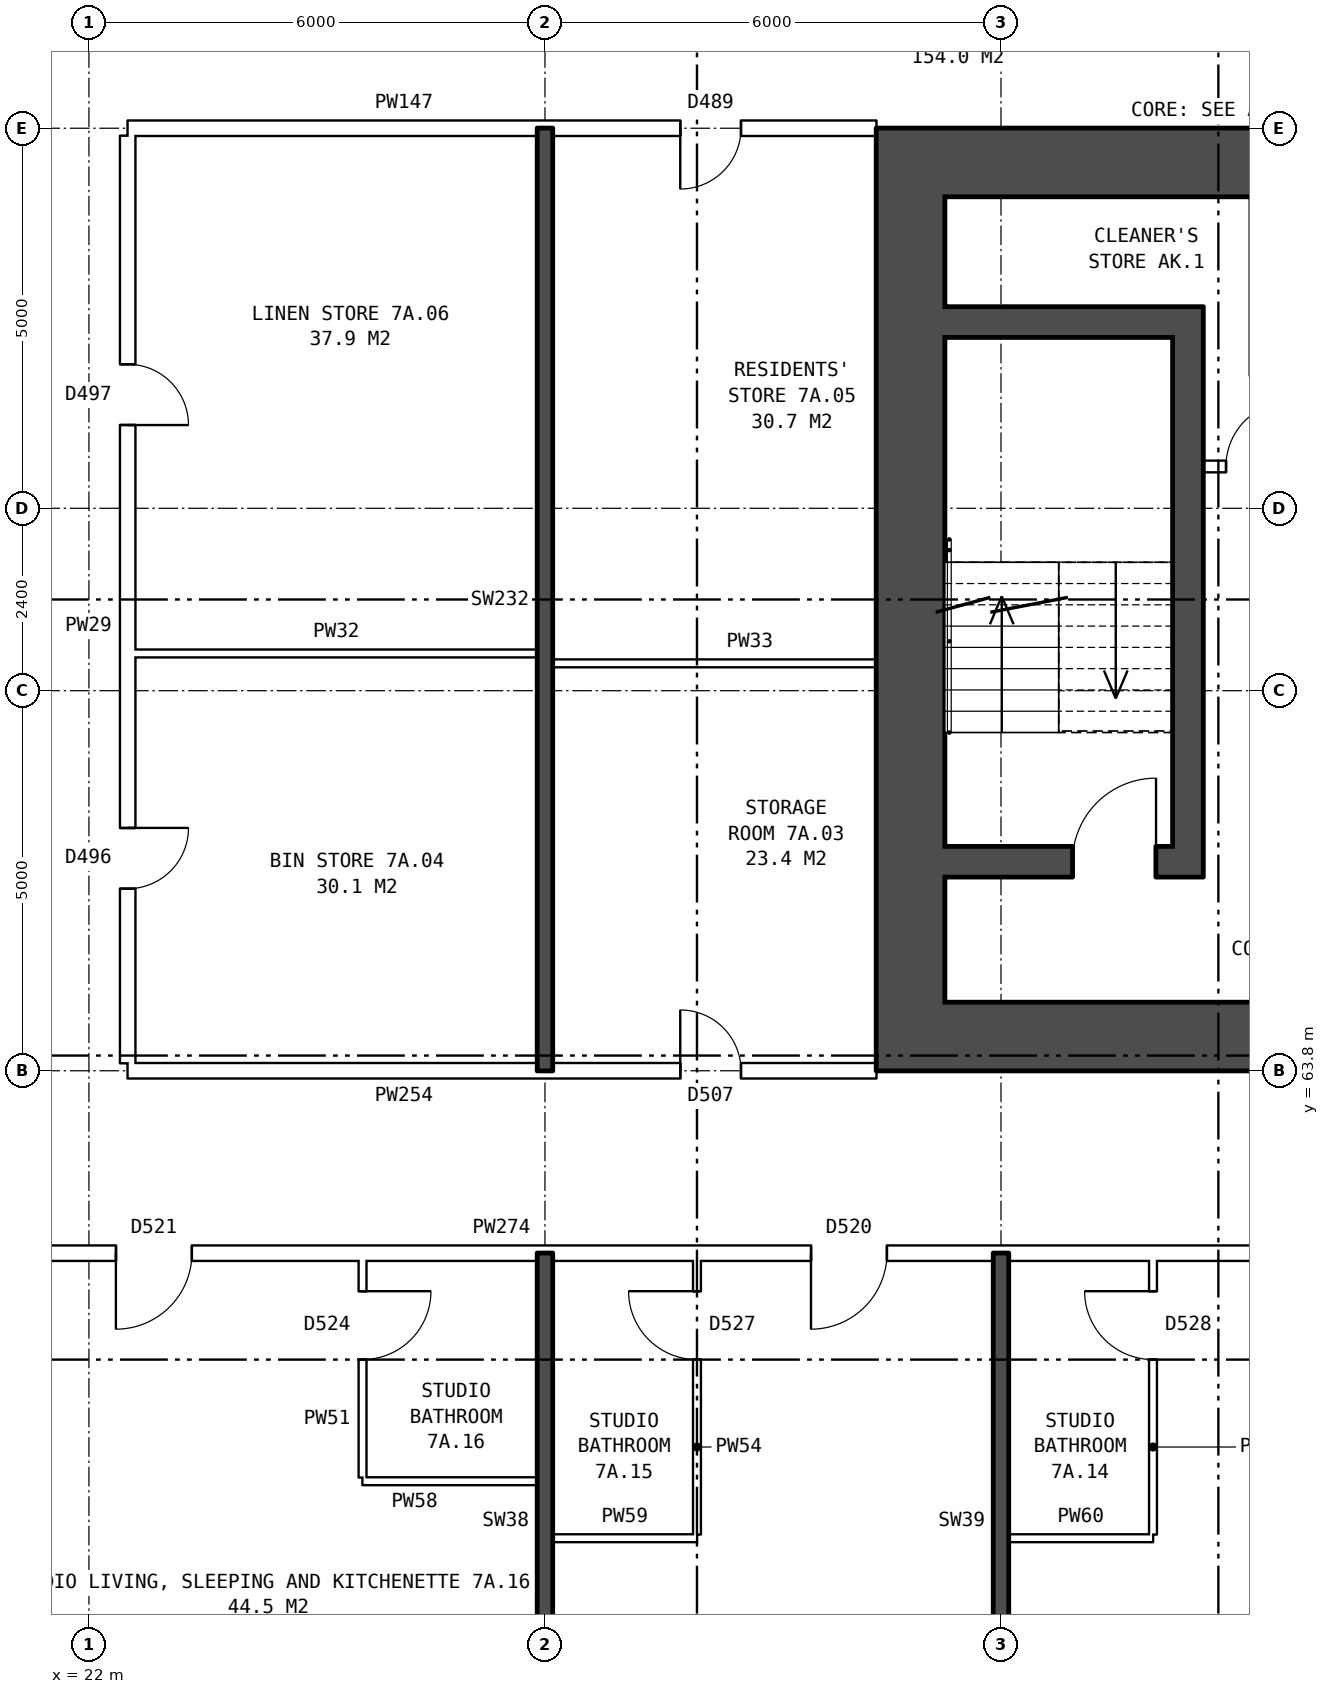
"""IFC4 building model, lengths in metres.
Left out: names, types, materials, properties, quantities, classifications, styles, units other than length and angle.
Written with IfcOpenShell. Run it as: python <this file> out.ifc"""

import sys

from ifc_helpers import new_model, si_unit, direction, frame, frame_2d, origin, place, context, subcontext, project, spatial, rectangle, extrude, element, fill, save


model = new_model("IFC4")
c1 = context("Model", 3, precision=1e-05, world=origin(), true_north=direction((0.0, 1.0)))
c2 = subcontext(c1, "Body", "Model", "MODEL_VIEW")
j1 = project(units=[si_unit("LENGTHUNIT", "METRE"), si_unit("PLANEANGLEUNIT", "RADIAN")], contexts=[c1])
p1 = place(None, origin())
s1 = spatial("IfcSite", under=j1, at=p1, CompositionType="ELEMENT")
p2 = place(p1, origin())
s2 = spatial("IfcBuilding", under=s1, at=p2, CompositionType="ELEMENT")
p3 = place(p2, frame((0.0, 0.0, 28.8)))
s3 = spatial("IfcBuildingStorey", under=s2, at=p3, CompositionType="ELEMENT", Elevation=28.8)
p4 = place(p3, frame((19.93, 57.075, 0.0), z_axis=(0.0, 0.0, 1.0), x_axis=(0.707106781187, -0.707106781187, 0.0)))
e1 = element("IfcWall", 1, at=p4, inside=s3, PredefinedType="STANDARD", context=c2, shape_type="SweptSolid", body=[
    extrude(rectangle(XDim=4.094, YDim=0.36, at=frame_2d((2.047, 0.0))), origin(), (0.0, 0.0, 1.0), 2.85),
])
p5 = place(p4, frame((1.247, 0.0, 0.8)))
e2 = element("IfcOpeningElement", 2, at=p5, cuts=e1, PredefinedType="OPENING", context=c2, shape_type="SweptSolid", body=[
    extrude(rectangle(XDim=1.6, YDim=1.8, at=frame_2d((0.8, 0.9))), frame((0.0, 0.19, 0.0), z_axis=(0.0, -1.0, 0.0), x_axis=(1.0, 0.0, 0.0)), (0.0, 0.0, 1.0), 0.38),
])
p6 = place(p3, frame((32.81, 75.3, 0.0), z_axis=(0.0, 0.0, 1.0), x_axis=(0.0, -1.0, 0.0)))
e3 = element("IfcWall", 3, at=p6, inside=s3, PredefinedType="SHEAR", context=c2, shape_type="SweptSolid", body=[
    extrude(rectangle(XDim=10.6, YDim=0.9, at=frame_2d((5.3, 0.0))), origin(), (0.0, 0.0, 1.0), 2.85),
])
for number, where, z_axis, x_axis in (
    (4, (41.36, 75.75, 0.0), (0.0, 0.0, 1.0), (-1.0, 0.0, 0.0)),
    (5, (41.36, 64.25, 0.0), (0.0, 0.0, 1.0), (-1.0, 0.0, 0.0)),
):
    element("IfcWall", number, at=place(p3, frame(where, z_axis=z_axis, x_axis=x_axis)), inside=s3, PredefinedType="SHEAR", context=c2, shape_type="SweptSolid", body=[
        extrude(rectangle(XDim=9.0, YDim=0.9, at=frame_2d((4.5, 0.0))), origin(), (0.0, 0.0, 1.0), 2.85),
    ])
p7 = place(p3, frame((36.26, 73.65, 0.0), z_axis=(0.0, 0.0, 1.0), x_axis=(-1.0, 0.0, 0.0)))
e6 = element("IfcWall", 6, at=p7, inside=s3, PredefinedType="SHEAR", context=c2, shape_type="SweptSolid", body=[
    extrude(rectangle(XDim=3.0, YDim=0.4, at=frame_2d((1.5, 0.0))), origin(), (0.0, 0.0, 1.0), 2.85),
])
p8 = place(p3, frame((38.11, 71.75, 0.0), z_axis=(0.0, 0.0, 1.0), x_axis=(-1.0, 0.0, 0.0)))
e7 = element("IfcWall", 7, at=p8, inside=s3, PredefinedType="PARTITIONING", context=c2, shape_type="SweptSolid", body=[
    extrude(rectangle(XDim=1.45, YDim=0.15, at=frame_2d((0.725, 0.0))), origin(), (0.0, 0.0, 1.0), 2.85),
])
p9 = place(p8, frame((0.3, 0.0, 0.0)))
e8 = element("IfcOpeningElement", 8, at=p9, cuts=e7, PredefinedType="OPENING", context=c2, shape_type="SweptSolid", body=[
    extrude(rectangle(XDim=0.85, YDim=2.1, at=frame_2d((0.425, 1.05))), frame((0.0, 0.085, 0.0), z_axis=(0.0, -1.0, 0.0), x_axis=(1.0, 0.0, 0.0)), (0.0, 0.0, 1.0), 0.17),
])
p10 = place(p3, frame((36.26, 66.55, 0.0), z_axis=(0.0, 0.0, 1.0), x_axis=(-1.0, 0.0, 0.0)))
e9 = element("IfcWall", 9, at=p10, inside=s3, PredefinedType="SHEAR", context=c2, shape_type="SweptSolid", body=[
    extrude(rectangle(XDim=3.0, YDim=0.4, at=frame_2d((1.5, 0.0))), origin(), (0.0, 0.0, 1.0), 2.85),
])
p11 = place(p10, frame((0.22, 0.0, 0.0)))
e10 = element("IfcOpeningElement", 10, at=p11, cuts=e9, PredefinedType="OPENING", context=c2, shape_type="SweptSolid", body=[
    extrude(rectangle(XDim=1.1, YDim=2.1, at=frame_2d((0.55, 1.05))), frame((0.0, 0.21, 0.0), z_axis=(0.0, -1.0, 0.0), x_axis=(1.0, 0.0, 0.0)), (0.0, 0.0, 1.0), 0.42),
])
p12 = place(p3, frame((36.46, 73.85, 0.0), z_axis=(0.0, 0.0, 1.0), x_axis=(0.0, -1.0, 0.0)))
e11 = element("IfcWall", 11, at=p12, inside=s3, PredefinedType="SHEAR", context=c2, shape_type="SweptSolid", body=[
    extrude(rectangle(XDim=7.5, YDim=0.4, at=frame_2d((3.75, 0.0))), origin(), (0.0, 0.0, 1.0), 2.85),
])
for number, where, z_axis, x_axis in (
    (12, (28.1, 57.65, 0.0), (0.0, 0.0, 1.0), (1.0, 0.0, 0.0)),
    (13, (34.1, 57.65, 0.0), (0.0, 0.0, 1.0), (1.0, 0.0, 0.0)),
):
    element("IfcWall", number, at=place(p3, frame(where, z_axis=z_axis, x_axis=x_axis)), inside=s3, PredefinedType="PARTITIONING", context=c2, shape_type="SweptSolid", body=[
        extrude(rectangle(XDim=1.9, YDim=0.1, at=frame_2d((0.95, 0.0))), origin(), (0.0, 0.0, 1.0), 2.85),
    ])
p13 = place(p3, frame((25.6, 58.4, 0.0), z_axis=(0.0, 0.0, 1.0), x_axis=(1.0, 0.0, 0.0)))
e14 = element("IfcWall", 14, at=p13, inside=s3, PredefinedType="PARTITIONING", context=c2, shape_type="SweptSolid", body=[
    extrude(rectangle(XDim=2.3, YDim=0.1, at=frame_2d((1.15, 0.0))), origin(), (0.0, 0.0, 1.0), 2.85),
])
p14 = place(p3, frame((20.11, 61.4, 0.0), z_axis=(0.0, 0.0, 1.0), x_axis=(1.0, 0.0, 0.0)))
e15 = element("IfcWall", 15, at=p14, inside=s3, PredefinedType="PARTITIONING", context=c2, shape_type="SweptSolid", body=[
    extrude(rectangle(XDim=25.79, YDim=0.2, at=frame_2d((12.895, 0.0))), origin(), (0.0, 0.0, 1.0), 2.85),
])
p15 = place(p14, frame((23.34, 0.0, 0.0)))
e16 = element("IfcOpeningElement", 16, at=p15, cuts=e15, PredefinedType="OPENING", context=c2, shape_type="SweptSolid", body=[
    extrude(rectangle(XDim=1.0, YDim=2.1, at=frame_2d((0.5, 1.05))), frame((0.0, 0.11, 0.0), z_axis=(0.0, -1.0, 0.0), x_axis=(1.0, 0.0, 0.0)), (0.0, 0.0, 1.0), 0.22),
])
p16 = place(p14, frame((17.39, 0.0, 0.0)))
e17 = element("IfcOpeningElement", 17, at=p16, cuts=e15, PredefinedType="OPENING", context=c2, shape_type="SweptSolid", body=[
    extrude(rectangle(XDim=1.0, YDim=2.1, at=frame_2d((0.5, 1.05))), frame((0.0, 0.11, 0.0), z_axis=(0.0, -1.0, 0.0), x_axis=(1.0, 0.0, 0.0)), (0.0, 0.0, 1.0), 0.22),
])
p17 = place(p14, frame((11.39, 0.0, 0.0)))
e18 = element("IfcOpeningElement", 18, at=p17, cuts=e15, PredefinedType="OPENING", context=c2, shape_type="SweptSolid", body=[
    extrude(rectangle(XDim=1.0, YDim=2.1, at=frame_2d((0.5, 1.05))), frame((0.0, 0.11, 0.0), z_axis=(0.0, -1.0, 0.0), x_axis=(1.0, 0.0, 0.0)), (0.0, 0.0, 1.0), 0.22),
])
p18 = place(p14, frame((2.245, 0.0, 0.0)))
e19 = element("IfcOpeningElement", 19, at=p18, cuts=e15, PredefinedType="OPENING", context=c2, shape_type="SweptSolid", body=[
    extrude(rectangle(XDim=1.0, YDim=2.1, at=frame_2d((0.5, 1.05))), frame((0.0, 0.11, 0.0), z_axis=(0.0, -1.0, 0.0), x_axis=(1.0, 0.0, 0.0)), (0.0, 0.0, 1.0), 0.22),
])
p19 = place(p3, frame((22.51, 63.8, 0.0), z_axis=(0.0, 0.0, 1.0), x_axis=(1.0, 0.0, 0.0)))
e20 = element("IfcWall", 20, at=p19, inside=s3, PredefinedType="PARTITIONING", context=c2, shape_type="SweptSolid", body=[
    extrude(rectangle(XDim=9.85, YDim=0.2, at=frame_2d((4.925, 0.0))), origin(), (0.0, 0.0, 1.0), 2.85),
])
p20 = place(p19, frame((7.27, 0.0, 0.0)))
e21 = element("IfcOpeningElement", 21, at=p20, cuts=e20, PredefinedType="OPENING", context=c2, shape_type="SweptSolid", body=[
    extrude(rectangle(XDim=0.8, YDim=2.1, at=frame_2d((0.4, 1.05))), frame((0.0, 0.11, 0.0), z_axis=(0.0, -1.0, 0.0), x_axis=(1.0, 0.0, 0.0)), (0.0, 0.0, 1.0), 0.22),
])
p21 = place(p3, frame((28.1, 69.16, 0.0), z_axis=(0.0, 0.0, 1.0), x_axis=(1.0, 0.0, 0.0)))
e22 = element("IfcWall", 22, at=p21, inside=s3, PredefinedType="PARTITIONING", context=c2, shape_type="SweptSolid", body=[
    extrude(rectangle(XDim=4.26, YDim=0.1, at=frame_2d((2.13, 0.0))), origin(), (0.0, 0.0, 1.0), 2.85),
])
p22 = place(p3, frame((22.61, 69.29, 0.0), z_axis=(0.0, 0.0, 1.0), x_axis=(1.0, 0.0, 0.0)))
e23 = element("IfcWall", 23, at=p22, inside=s3, PredefinedType="PARTITIONING", context=c2, shape_type="SweptSolid", body=[
    extrude(rectangle(XDim=5.29, YDim=0.1, at=frame_2d((2.645, 0.0))), origin(), (0.0, 0.0, 1.0), 2.85),
])
p23 = place(p3, frame((22.51, 76.2, 0.0), z_axis=(0.0, 0.0, 1.0), x_axis=(1.0, 0.0, 0.0)))
e24 = element("IfcWall", 24, at=p23, inside=s3, PredefinedType="PARTITIONING", context=c2, shape_type="SweptSolid", body=[
    extrude(rectangle(XDim=9.85, YDim=0.2, at=frame_2d((4.925, 0.0))), origin(), (0.0, 0.0, 1.0), 2.85),
])
p24 = place(p23, frame((7.27, 0.0, 0.0)))
e25 = element("IfcOpeningElement", 25, at=p24, cuts=e24, PredefinedType="OPENING", context=c2, shape_type="SweptSolid", body=[
    extrude(rectangle(XDim=0.8, YDim=2.1, at=frame_2d((0.4, 1.05))), frame((0.0, 0.11, 0.0), z_axis=(0.0, -1.0, 0.0), x_axis=(1.0, 0.0, 0.0)), (0.0, 0.0, 1.0), 0.22),
])
p25 = place(p3, frame((22.51, 63.9, 0.0), z_axis=(0.0, 0.0, 1.0), x_axis=(0.0, 1.0, 0.0)))
e26 = element("IfcWall", 26, at=p25, inside=s3, PredefinedType="PARTITIONING", context=c2, shape_type="SweptSolid", body=[
    extrude(rectangle(XDim=12.2, YDim=0.2, at=frame_2d((6.1, 0.0))), origin(), (0.0, 0.0, 1.0), 2.85),
])
p26 = place(p25, frame((2.295, 0.0, 0.0)))
e27 = element("IfcOpeningElement", 27, at=p26, cuts=e26, PredefinedType="OPENING", context=c2, shape_type="SweptSolid", body=[
    extrude(rectangle(XDim=0.8, YDim=2.1, at=frame_2d((0.4, 1.05))), frame((0.0, 0.11, 0.0), z_axis=(0.0, -1.0, 0.0), x_axis=(1.0, 0.0, 0.0)), (0.0, 0.0, 1.0), 0.22),
])
p27 = place(p25, frame((8.395, 0.0, 0.0)))
e28 = element("IfcOpeningElement", 28, at=p27, cuts=e26, PredefinedType="OPENING", context=c2, shape_type="SweptSolid", body=[
    extrude(rectangle(XDim=0.8, YDim=2.1, at=frame_2d((0.4, 1.05))), frame((0.0, 0.11, 0.0), z_axis=(0.0, -1.0, 0.0), x_axis=(1.0, 0.0, 0.0)), (0.0, 0.0, 1.0), 0.22),
])
p28 = place(p3, frame((25.6, 58.45, 0.0), z_axis=(0.0, 0.0, 1.0), x_axis=(0.0, 1.0, 0.0)))
e29 = element("IfcWall", 29, at=p28, inside=s3, PredefinedType="PARTITIONING", context=c2, shape_type="SweptSolid", body=[
    extrude(rectangle(XDim=2.85, YDim=0.1, at=frame_2d((1.425, 0.0))), origin(), (0.0, 0.0, 1.0), 2.85),
])
p29 = place(p28, frame((1.55, 0.0, 0.0)))
e30 = element("IfcOpeningElement", 30, at=p29, cuts=e29, PredefinedType="OPENING", context=c2, shape_type="SweptSolid", body=[
    extrude(rectangle(XDim=0.9, YDim=2.1, at=frame_2d((0.45, 1.05))), frame((0.0, 0.06, 0.0), z_axis=(0.0, -1.0, 0.0), x_axis=(1.0, 0.0, 0.0)), (0.0, 0.0, 1.0), 0.12),
])
p30 = place(p3, frame((28.0, 54.36, 0.0), z_axis=(0.0, 0.0, 1.0), x_axis=(0.0, 1.0, 0.0)))
e31 = element("IfcWall", 31, at=p30, inside=s3, PredefinedType="SOLIDWALL", context=c2, shape_type="SweptSolid", body=[
    extrude(rectangle(XDim=7.04, YDim=0.2, at=frame_2d((3.52, 0.0))), origin(), (0.0, 0.0, 1.0), 2.85),
])
p31 = place(p3, frame((28.0, 63.8, 0.0), z_axis=(0.0, 0.0, 1.0), x_axis=(0.0, 1.0, 0.0)))
e32 = element("IfcWall", 32, at=p31, inside=s3, PredefinedType="SOLIDWALL", context=c2, shape_type="SweptSolid", body=[
    extrude(rectangle(XDim=12.4, YDim=0.2, at=frame_2d((6.2, 0.0))), origin(), (0.0, 0.0, 1.0), 2.85),
])
p32 = place(p3, frame((30.0, 57.7, 0.0), z_axis=(0.0, 0.0, 1.0), x_axis=(0.0, 1.0, 0.0)))
e33 = element("IfcWall", 33, at=p32, inside=s3, PredefinedType="PARTITIONING", context=c2, shape_type="SweptSolid", body=[
    extrude(rectangle(XDim=3.6, YDim=0.1, at=frame_2d((1.8, 0.0))), origin(), (0.0, 0.0, 1.0), 2.85),
])
p33 = place(p32, frame((2.3, 0.0, 0.0)))
e34 = element("IfcOpeningElement", 34, at=p33, cuts=e33, PredefinedType="OPENING", context=c2, shape_type="SweptSolid", body=[
    extrude(rectangle(XDim=0.9, YDim=2.1, at=frame_2d((0.45, 1.05))), frame((0.0, 0.06, 0.0), z_axis=(0.0, -1.0, 0.0), x_axis=(1.0, 0.0, 0.0)), (0.0, 0.0, 1.0), 0.12),
])
p34 = place(p3, frame((34.0, 54.36, 0.0), z_axis=(0.0, 0.0, 1.0), x_axis=(0.0, 1.0, 0.0)))
e35 = element("IfcWall", 35, at=p34, inside=s3, PredefinedType="SOLIDWALL", context=c2, shape_type="SweptSolid", body=[
    extrude(rectangle(XDim=7.04, YDim=0.2, at=frame_2d((3.52, 0.0))), origin(), (0.0, 0.0, 1.0), 2.85),
])
p35 = place(p3, frame((36.0, 57.7, 0.0), z_axis=(0.0, 0.0, 1.0), x_axis=(0.0, 1.0, 0.0)))
e36 = element("IfcWall", 36, at=p35, inside=s3, PredefinedType="PARTITIONING", context=c2, shape_type="SweptSolid", body=[
    extrude(rectangle(XDim=3.6, YDim=0.1, at=frame_2d((1.8, 0.0))), origin(), (0.0, 0.0, 1.0), 2.85),
])
p36 = place(p35, frame((2.3, 0.0, 0.0)))
e37 = element("IfcOpeningElement", 37, at=p36, cuts=e36, PredefinedType="OPENING", context=c2, shape_type="SweptSolid", body=[
    extrude(rectangle(XDim=0.9, YDim=2.1, at=frame_2d((0.45, 1.05))), frame((0.0, 0.06, 0.0), z_axis=(0.0, -1.0, 0.0), x_axis=(1.0, 0.0, 0.0)), (0.0, 0.0, 1.0), 0.12),
])
p37 = place(p11, frame((1.1, 0.0, 0.0), z_axis=(0.0, 0.0, 1.0), x_axis=(-1.0, 0.0, 0.0)))
e38 = element("IfcDoor", 38, at=p37, inside=s3, OperationType="SINGLE_SWING_RIGHT", PredefinedType="DOOR", context=c2, shape_type="SweptSolid", body=[
    extrude(rectangle(XDim=1.1, YDim=2.1, at=frame_2d((0.55, 1.05))), frame((0.0, 0.025, 0.0), z_axis=(0.0, -1.0, 0.0), x_axis=(1.0, 0.0, 0.0)), (0.0, 0.0, 1.0), 0.05),
])
fill(e10, e38)
p38 = place(p9, frame((0.85, 0.0, 0.0), z_axis=(0.0, 0.0, 1.0), x_axis=(-1.0, 0.0, 0.0)))
e39 = element("IfcDoor", 39, at=p38, inside=s3, OperationType="SINGLE_SWING_RIGHT", PredefinedType="DOOR", context=c2, shape_type="SweptSolid", body=[
    extrude(rectangle(XDim=0.85, YDim=2.1, at=frame_2d((0.425, 1.05))), frame((0.0, 0.025, 0.0), z_axis=(0.0, -1.0, 0.0), x_axis=(1.0, 0.0, 0.0)), (0.0, 0.0, 1.0), 0.05),
])
fill(e8, e39)
p39 = place(p20, origin())
e40 = element("IfcDoor", 40, at=p39, inside=s3, OperationType="SINGLE_SWING_LEFT", PredefinedType="DOOR", context=c2, shape_type="SweptSolid", body=[
    extrude(rectangle(XDim=0.8, YDim=2.1, at=frame_2d((0.4, 1.05))), frame((0.0, 0.025, 0.0), z_axis=(0.0, -1.0, 0.0), x_axis=(1.0, 0.0, 0.0)), (0.0, 0.0, 1.0), 0.05),
])
fill(e21, e40)
p40 = place(p26, frame((0.8, 0.0, 0.0), z_axis=(0.0, 0.0, 1.0), x_axis=(-1.0, 0.0, 0.0)))
e41 = element("IfcDoor", 41, at=p40, inside=s3, OperationType="SINGLE_SWING_LEFT", PredefinedType="DOOR", context=c2, shape_type="SweptSolid", body=[
    extrude(rectangle(XDim=0.8, YDim=2.1, at=frame_2d((0.4, 1.05))), frame((0.0, 0.025, 0.0), z_axis=(0.0, -1.0, 0.0), x_axis=(1.0, 0.0, 0.0)), (0.0, 0.0, 1.0), 0.05),
])
fill(e27, e41)
p41 = place(p24, frame((0.8, 0.0, 0.0), z_axis=(0.0, 0.0, 1.0), x_axis=(-1.0, 0.0, 0.0)))
e42 = element("IfcDoor", 42, at=p41, inside=s3, OperationType="SINGLE_SWING_RIGHT", PredefinedType="DOOR", context=c2, shape_type="SweptSolid", body=[
    extrude(rectangle(XDim=0.8, YDim=2.1, at=frame_2d((0.4, 1.05))), frame((0.0, 0.025, 0.0), z_axis=(0.0, -1.0, 0.0), x_axis=(1.0, 0.0, 0.0)), (0.0, 0.0, 1.0), 0.05),
])
fill(e25, e42)
p42 = place(p27, frame((0.8, 0.0, 0.0), z_axis=(0.0, 0.0, 1.0), x_axis=(-1.0, 0.0, 0.0)))
e43 = element("IfcDoor", 43, at=p42, inside=s3, OperationType="SINGLE_SWING_RIGHT", PredefinedType="DOOR", context=c2, shape_type="SweptSolid", body=[
    extrude(rectangle(XDim=0.8, YDim=2.1, at=frame_2d((0.4, 1.05))), frame((0.0, 0.025, 0.0), z_axis=(0.0, -1.0, 0.0), x_axis=(1.0, 0.0, 0.0)), (0.0, 0.0, 1.0), 0.05),
])
fill(e28, e43)
p43 = place(p36, origin())
e44 = element("IfcDoor", 44, at=p43, inside=s3, OperationType="SINGLE_SWING_RIGHT", PredefinedType="DOOR", context=c2, shape_type="SweptSolid", body=[
    extrude(rectangle(XDim=0.9, YDim=2.1, at=frame_2d((0.45, 1.05))), frame((0.0, 0.025, 0.0), z_axis=(0.0, -1.0, 0.0), x_axis=(1.0, 0.0, 0.0)), (0.0, 0.0, 1.0), 0.05),
])
fill(e37, e44)
p44 = place(p17, frame((1.0, 0.0, 0.0), z_axis=(0.0, 0.0, 1.0), x_axis=(-1.0, 0.0, 0.0)))
e45 = element("IfcDoor", 45, at=p44, inside=s3, OperationType="SINGLE_SWING_RIGHT", PredefinedType="DOOR", context=c2, shape_type="SweptSolid", body=[
    extrude(rectangle(XDim=1.0, YDim=2.1, at=frame_2d((0.5, 1.05))), frame((0.0, 0.025, 0.0), z_axis=(0.0, -1.0, 0.0), x_axis=(1.0, 0.0, 0.0)), (0.0, 0.0, 1.0), 0.05),
])
fill(e18, e45)
p45 = place(p33, origin())
e46 = element("IfcDoor", 46, at=p45, inside=s3, OperationType="SINGLE_SWING_RIGHT", PredefinedType="DOOR", context=c2, shape_type="SweptSolid", body=[
    extrude(rectangle(XDim=0.9, YDim=2.1, at=frame_2d((0.45, 1.05))), frame((0.0, 0.025, 0.0), z_axis=(0.0, -1.0, 0.0), x_axis=(1.0, 0.0, 0.0)), (0.0, 0.0, 1.0), 0.05),
])
fill(e34, e46)
p46 = place(p18, frame((1.0, 0.0, 0.0), z_axis=(0.0, 0.0, 1.0), x_axis=(-1.0, 0.0, 0.0)))
e47 = element("IfcDoor", 47, at=p46, inside=s3, OperationType="SINGLE_SWING_RIGHT", PredefinedType="DOOR", context=c2, shape_type="SweptSolid", body=[
    extrude(rectangle(XDim=1.0, YDim=2.1, at=frame_2d((0.5, 1.05))), frame((0.0, 0.025, 0.0), z_axis=(0.0, -1.0, 0.0), x_axis=(1.0, 0.0, 0.0)), (0.0, 0.0, 1.0), 0.05),
])
fill(e19, e47)
p47 = place(p29, frame((0.9, 0.0, 0.0), z_axis=(0.0, 0.0, 1.0), x_axis=(-1.0, 0.0, 0.0)))
e48 = element("IfcDoor", 48, at=p47, inside=s3, OperationType="SINGLE_SWING_LEFT", PredefinedType="DOOR", context=c2, shape_type="SweptSolid", body=[
    extrude(rectangle(XDim=0.9, YDim=2.1, at=frame_2d((0.45, 1.05))), frame((0.0, 0.025, 0.0), z_axis=(0.0, -1.0, 0.0), x_axis=(1.0, 0.0, 0.0)), (0.0, 0.0, 1.0), 0.05),
])
fill(e30, e48)
save(model, sys.argv[1])
